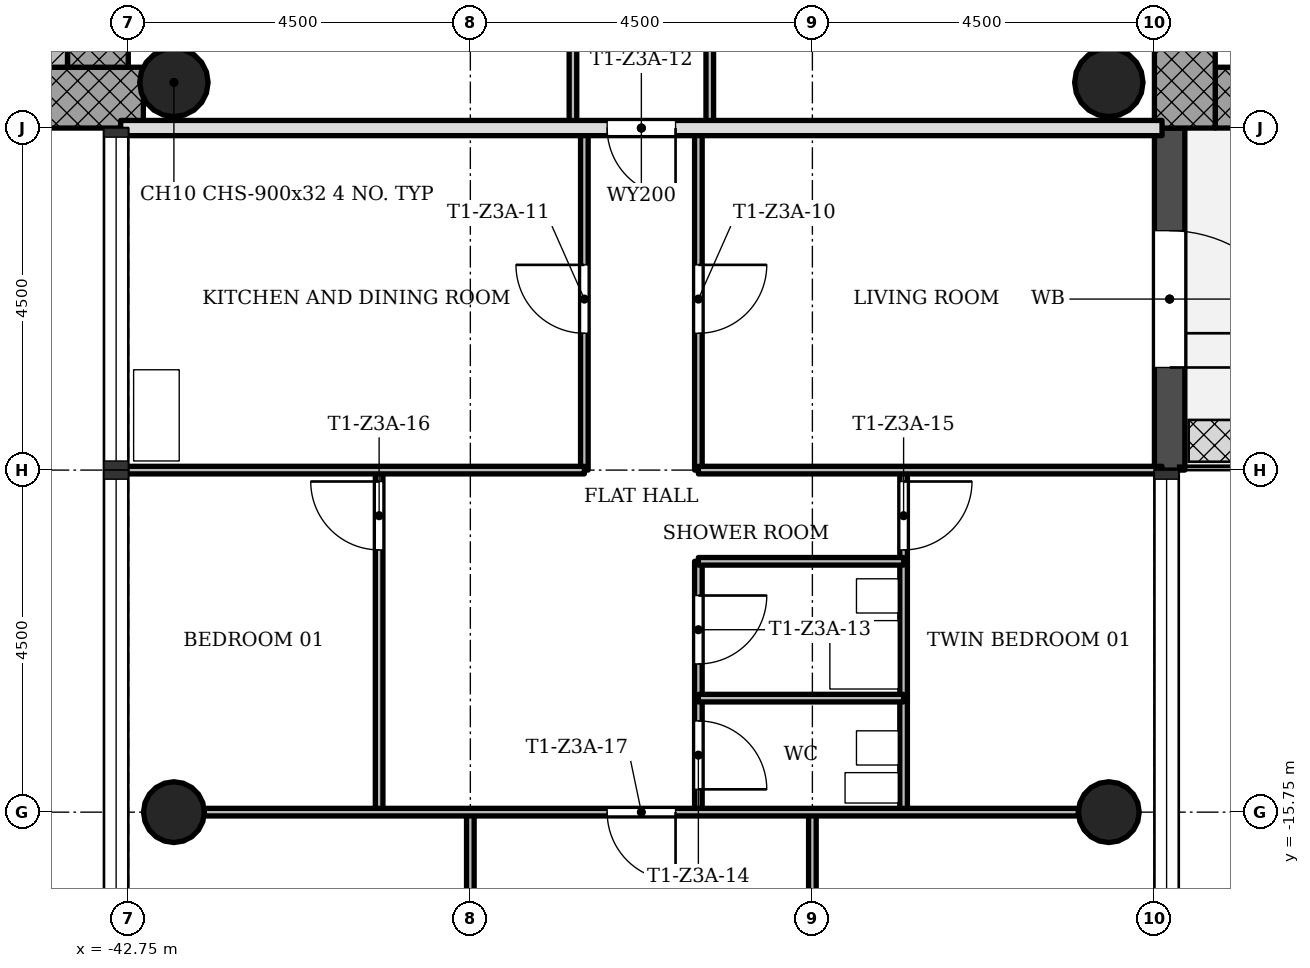
"""IFC4 building model, lengths in metres.
Left out: names, types, materials, properties, quantities, classifications, styles, units other than length and angle.
Written with IfcOpenShell. Run it as: python <this file> out.ifc"""

import sys

from ifc_helpers import new_model, si_unit, direction, frame, frame_2d, origin, origin_2d, place, context, subcontext, project, spatial, rectangle, hollow_circle, extrude, element, fill, save


model = new_model("IFC4")
c1 = context("Model", 3, precision=1e-05, world=origin(), true_north=direction((0.0, 1.0)))
c2 = subcontext(c1, "Body", "Model", "MODEL_VIEW")
j1 = project(units=[si_unit("LENGTHUNIT", "METRE"), si_unit("PLANEANGLEUNIT", "RADIAN")], contexts=[c1])
p1 = place(None, origin())
s1 = spatial("IfcSite", under=j1, at=p1, CompositionType="ELEMENT")
p2 = place(p1, origin())
s2 = spatial("IfcBuilding", under=s1, at=p2, CompositionType="ELEMENT")
p3 = place(p2, frame((0.0, 0.0, 140.5)))
s3 = spatial("IfcBuildingStorey", under=s2, at=p3, CompositionType="ELEMENT", Elevation=140.5)
p4 = place(p3, frame((-28.45, -6.35, 0.0), z_axis=(0.0, 0.0, 1.0), x_axis=(1.0, 0.0, 0.0)))
e1 = element("IfcWall", 1, at=p4, inside=s3, PredefinedType="SHEAR", context=c2, shape_type="SweptSolid", body=[
    extrude(rectangle(XDim=8.2, YDim=0.8, at=frame_2d((4.1, 0.0))), origin(), (0.0, 0.0, 1.0), 3.4),
])
p5 = place(p3, frame((-28.85, 5.95, 0.0), z_axis=(0.0, 0.0, 1.0), x_axis=(0.0, -1.0, 0.0)))
e2 = element("IfcWall", 2, at=p5, inside=s3, PredefinedType="SHEAR", context=c2, shape_type="SweptSolid", body=[
    extrude(rectangle(XDim=12.7, YDim=0.8, at=frame_2d((6.35, 0.0))), origin(), (0.0, 0.0, 1.0), 3.4),
])
p6 = place(p5, frame((5.05, 0.0, 0.0)))
e3 = element("IfcOpeningElement", 3, at=p6, cuts=e2, PredefinedType="OPENING", context=c2, shape_type="SweptSolid", body=[
    extrude(rectangle(XDim=1.8, YDim=2.1, at=frame_2d((0.9, 1.05))), frame((0.0, 0.41, 0.0), z_axis=(0.0, -1.0, 0.0), x_axis=(1.0, 0.0, 0.0)), (0.0, 0.0, 1.0), 0.82),
])
p7 = place(p3, frame((-50.95, -6.35, 0.0), z_axis=(0.0, 0.0, 1.0), x_axis=(1.0, 0.0, 0.0)))
e4 = element("IfcWall", 4, at=p7, inside=s3, PredefinedType="SHEAR", context=c2, shape_type="SweptSolid", body=[
    extrude(rectangle(XDim=8.398, YDim=0.8, at=frame_2d((4.199, 0.0))), origin(), (0.0, 0.0, 1.0), 3.4),
])
p8 = place(p3, frame((-43.15, -5.95, 0.0), z_axis=(0.0, 0.0, 1.0), x_axis=(0.0, 1.0, 0.0)))
e5 = element("IfcWall", 5, at=p8, inside=s3, PredefinedType="SHEAR", context=c2, shape_type="SweptSolid", body=[
    extrude(rectangle(XDim=12.7, YDim=0.8, at=frame_2d((6.35, 0.0))), origin(), (0.0, 0.0, 1.0), 3.4),
])
p9 = place(p8, frame((5.05, 0.0, 0.0)))
e6 = element("IfcOpeningElement", 6, at=p9, cuts=e5, PredefinedType="OPENING", context=c2, shape_type="SweptSolid", body=[
    extrude(rectangle(XDim=1.8, YDim=2.1, at=frame_2d((0.9, 1.05))), frame((0.0, 0.41, 0.0), z_axis=(0.0, -1.0, 0.0), x_axis=(1.0, 0.0, 0.0)), (0.0, 0.0, 1.0), 0.82),
])
for number, where, z_axis, x_axis in (
    (7, (-42.15, -15.75, 0.0), (0.0, 0.0, 1.0), (1.0, 0.0, 0.0)),
    (8, (-29.85, -15.75, 0.0), (0.0, 0.0, 1.0), (1.0, 0.0, 0.0)),
):
    element("IfcColumn", number, at=place(p3, frame(where, z_axis=z_axis, x_axis=x_axis)), inside=s3, PredefinedType="COLUMN", context=c2, shape_type="SweptSolid", body=[
        extrude(hollow_circle(Radius=0.4, WallThickness=0.028, at=origin_2d()), origin(), (0.0, 0.0, 1.0), 3.4),
    ])
for number, where, z_axis, x_axis in (
    (9, (-42.15, -6.15, 0.0), (0.0, 0.0, 1.0), (1.0, 0.0, 0.0)),
    (10, (-29.85, -6.15, 0.0), (0.0, 0.0, 1.0), (1.0, 0.0, 0.0)),
):
    element("IfcColumn", number, at=place(p3, frame(where, z_axis=z_axis, x_axis=x_axis)), inside=s3, PredefinedType="COLUMN", context=c2, shape_type="SweptSolid", body=[
        extrude(hollow_circle(Radius=0.45, WallThickness=0.032, at=origin_2d()), origin(), (0.0, 0.0, 1.0), 3.4),
    ])
p10 = place(p3, frame((-29.05, -11.25, -0.02), z_axis=(0.0, 0.0, 1.0), x_axis=(0.0, 1.0, 0.0)))
e11 = element("IfcWall", 11, at=p10, inside=s3, PredefinedType="STANDARD", context=c2, shape_type="SweptSolid", body=[
    extrude(rectangle(XDim=4.5, YDim=0.4, at=frame_2d((2.25, 0.0))), origin(), (0.0, 0.0, 1.0), 3.12),
])
p11 = place(p10, frame((1.35, 0.0, 0.02)))
e12 = element("IfcOpeningElement", 12, at=p11, cuts=e11, PredefinedType="OPENING", context=c2, shape_type="SweptSolid", body=[
    extrude(rectangle(XDim=1.8, YDim=2.1, at=frame_2d((0.9, 1.05))), frame((0.0, 0.21, 0.0), z_axis=(0.0, -1.0, 0.0), x_axis=(1.0, 0.0, 0.0)), (0.0, 0.0, 1.0), 0.42),
])
p12 = place(p3, frame((-39.45, -15.75, 0.0), z_axis=(0.0, 0.0, 1.0), x_axis=(0.0, 1.0, 0.0)))
e13 = element("IfcWall", 13, at=p12, inside=s3, PredefinedType="PARTITIONING", context=c2, shape_type="SweptSolid", body=[
    extrude(rectangle(XDim=4.5, YDim=0.1, at=frame_2d((2.25, 0.0))), origin(), (0.0, 0.0, 1.0), 3.0),
])
p13 = place(p12, frame((3.45, 0.0, 0.0)))
e14 = element("IfcOpeningElement", 14, at=p13, cuts=e13, PredefinedType="OPENING", context=c2, shape_type="SweptSolid", body=[
    extrude(rectangle(XDim=0.9, YDim=2.1, at=frame_2d((0.45, 1.05))), frame((0.0, 0.06, 0.0), z_axis=(0.0, -1.0, 0.0), x_axis=(1.0, 0.0, 0.0)), (0.0, 0.0, 1.0), 0.12),
])
p14 = place(p3, frame((-38.25, -20.35, 0.0), z_axis=(0.0, 0.0, 1.0), x_axis=(0.0, 1.0, 0.0)))
e15 = element("IfcWall", 15, at=p14, inside=s3, PredefinedType="PARTITIONING", context=c2, shape_type="SweptSolid", body=[
    extrude(rectangle(XDim=4.6, YDim=0.1, at=frame_2d((2.3, 0.0))), origin(), (0.0, 0.0, 1.0), 3.0),
])
p15 = place(p14, frame((2.65, 0.0, 0.0)))
e16 = element("IfcOpeningElement", 16, at=p15, cuts=e15, PredefinedType="OPENING", context=c2, shape_type="SweptSolid", body=[
    extrude(rectangle(XDim=0.9, YDim=2.1, at=frame_2d((0.45, 1.05))), frame((0.0, 0.06, 0.0), z_axis=(0.0, -1.0, 0.0), x_axis=(1.0, 0.0, 0.0)), (0.0, 0.0, 1.0), 0.12),
])
p16 = place(p3, frame((-36.9, -6.75, 0.0), z_axis=(0.0, 0.0, 1.0), x_axis=(0.0, 1.0, 0.0)))
e17 = element("IfcWall", 17, at=p16, inside=s3, PredefinedType="PARTITIONING", context=c2, shape_type="SweptSolid", body=[
    extrude(rectangle(XDim=2.25, YDim=0.1, at=frame_2d((1.125, 0.0))), origin(), (0.0, 0.0, 1.0), 3.0),
])
p17 = place(p3, frame((-36.75, -11.25, 0.0), z_axis=(0.0, 0.0, 1.0), x_axis=(0.0, 1.0, 0.0)))
e18 = element("IfcWall", 18, at=p17, inside=s3, PredefinedType="PARTITIONING", context=c2, shape_type="SweptSolid", body=[
    extrude(rectangle(XDim=4.5, YDim=0.1, at=frame_2d((2.25, 0.0))), origin(), (0.0, 0.0, 1.0), 3.0),
])
p18 = place(p17, frame((1.8, 0.0, 0.0)))
e19 = element("IfcOpeningElement", 19, at=p18, cuts=e18, PredefinedType="OPENING", context=c2, shape_type="SweptSolid", body=[
    extrude(rectangle(XDim=0.9, YDim=2.1, at=frame_2d((0.45, 1.05))), frame((0.0, 0.06, 0.0), z_axis=(0.0, -1.0, 0.0), x_axis=(1.0, 0.0, 0.0)), (0.0, 0.0, 1.0), 0.12),
])
p19 = place(p3, frame((-35.25, -15.75, 0.0), z_axis=(0.0, 0.0, 1.0), x_axis=(0.0, 1.0, 0.0)))
e20 = element("IfcWall", 20, at=p19, inside=s3, PredefinedType="PARTITIONING", context=c2, shape_type="SweptSolid", body=[
    extrude(rectangle(XDim=3.3, YDim=0.1, at=frame_2d((1.65, 0.0))), origin(), (0.0, 0.0, 1.0), 3.0),
])
p20 = place(p19, frame((1.95, 0.0, 0.0)))
e21 = element("IfcOpeningElement", 21, at=p20, cuts=e20, PredefinedType="OPENING", context=c2, shape_type="SweptSolid", body=[
    extrude(rectangle(XDim=0.9, YDim=2.1, at=frame_2d((0.45, 1.05))), frame((0.0, 0.06, 0.0), z_axis=(0.0, -1.0, 0.0), x_axis=(1.0, 0.0, 0.0)), (0.0, 0.0, 1.0), 0.12),
])
p21 = place(p19, frame((0.3, 0.0, 0.0)))
e22 = element("IfcOpeningElement", 22, at=p21, cuts=e20, PredefinedType="OPENING", context=c2, shape_type="SweptSolid", body=[
    extrude(rectangle(XDim=0.9, YDim=2.1, at=frame_2d((0.45, 1.05))), frame((0.0, 0.06, 0.0), z_axis=(0.0, -1.0, 0.0), x_axis=(1.0, 0.0, 0.0)), (0.0, 0.0, 1.0), 0.12),
])
p22 = place(p3, frame((-35.25, -11.25, 0.0), z_axis=(0.0, 0.0, 1.0), x_axis=(0.0, 1.0, 0.0)))
e23 = element("IfcWall", 23, at=p22, inside=s3, PredefinedType="PARTITIONING", context=c2, shape_type="SweptSolid", body=[
    extrude(rectangle(XDim=4.5, YDim=0.1, at=frame_2d((2.25, 0.0))), origin(), (0.0, 0.0, 1.0), 3.0),
])
p23 = place(p22, frame((1.8, 0.0, 0.0)))
e24 = element("IfcOpeningElement", 24, at=p23, cuts=e23, PredefinedType="OPENING", context=c2, shape_type="SweptSolid", body=[
    extrude(rectangle(XDim=0.9, YDim=2.1, at=frame_2d((0.45, 1.05))), frame((0.0, 0.06, 0.0), z_axis=(0.0, -1.0, 0.0), x_axis=(1.0, 0.0, 0.0)), (0.0, 0.0, 1.0), 0.12),
])
p24 = place(p3, frame((-35.1, -6.75, 0.0), z_axis=(0.0, 0.0, 1.0), x_axis=(0.0, 1.0, 0.0)))
e25 = element("IfcWall", 25, at=p24, inside=s3, PredefinedType="PARTITIONING", context=c2, shape_type="SweptSolid", body=[
    extrude(rectangle(XDim=2.25, YDim=0.1, at=frame_2d((1.125, 0.0))), origin(), (0.0, 0.0, 1.0), 3.0),
])
p25 = place(p3, frame((-33.75, -20.35, 0.0), z_axis=(0.0, 0.0, 1.0), x_axis=(0.0, 1.0, 0.0)))
e26 = element("IfcWall", 26, at=p25, inside=s3, PredefinedType="PARTITIONING", context=c2, shape_type="SweptSolid", body=[
    extrude(rectangle(XDim=4.6, YDim=0.1, at=frame_2d((2.3, 0.0))), origin(), (0.0, 0.0, 1.0), 3.0),
])
p26 = place(p25, frame((2.65, 0.0, 0.0)))
e27 = element("IfcOpeningElement", 27, at=p26, cuts=e26, PredefinedType="OPENING", context=c2, shape_type="SweptSolid", body=[
    extrude(rectangle(XDim=0.9, YDim=2.1, at=frame_2d((0.45, 1.05))), frame((0.0, 0.06, 0.0), z_axis=(0.0, -1.0, 0.0), x_axis=(1.0, 0.0, 0.0)), (0.0, 0.0, 1.0), 0.12),
])
p27 = place(p3, frame((-32.55, -15.75, 0.0), z_axis=(0.0, 0.0, 1.0), x_axis=(0.0, 1.0, 0.0)))
e28 = element("IfcWall", 28, at=p27, inside=s3, PredefinedType="PARTITIONING", context=c2, shape_type="SweptSolid", body=[
    extrude(rectangle(XDim=4.5, YDim=0.1, at=frame_2d((2.25, 0.0))), origin(), (0.0, 0.0, 1.0), 3.0),
])
p28 = place(p27, frame((3.45, 0.0, 0.0)))
e29 = element("IfcOpeningElement", 29, at=p28, cuts=e28, PredefinedType="OPENING", context=c2, shape_type="SweptSolid", body=[
    extrude(rectangle(XDim=0.9, YDim=2.1, at=frame_2d((0.45, 1.05))), frame((0.0, 0.06, 0.0), z_axis=(0.0, -1.0, 0.0), x_axis=(1.0, 0.0, 0.0)), (0.0, 0.0, 1.0), 0.12),
])
p29 = place(p3, frame((-41.75, -15.75, 0.0), z_axis=(0.0, 0.0, 1.0), x_axis=(1.0, 0.0, 0.0)))
e30 = element("IfcWall", 30, at=p29, inside=s3, PredefinedType="PARTITIONING", context=c2, shape_type="SweptSolid", body=[
    extrude(rectangle(XDim=11.5, YDim=0.1, at=frame_2d((5.75, 0.0))), origin(), (0.0, 0.0, 1.0), 3.0),
])
p30 = place(p29, frame((5.3, 0.0, 0.0)))
e31 = element("IfcOpeningElement", 31, at=p30, cuts=e30, PredefinedType="OPENING", context=c2, shape_type="SweptSolid", body=[
    extrude(rectangle(XDim=0.9, YDim=2.1, at=frame_2d((0.45, 1.05))), frame((0.0, 0.06, 0.0), z_axis=(0.0, -1.0, 0.0), x_axis=(1.0, 0.0, 0.0)), (0.0, 0.0, 1.0), 0.12),
])
for number, where, z_axis, x_axis in (
    (32, (-35.25, -14.25, 0.0), (0.0, 0.0, 1.0), (1.0, 0.0, 0.0)),
    (33, (-35.25, -12.45, 0.0), (0.0, 0.0, 1.0), (1.0, 0.0, 0.0)),
):
    element("IfcWall", number, at=place(p3, frame(where, z_axis=z_axis, x_axis=x_axis)), inside=s3, PredefinedType="PARTITIONING", context=c2, shape_type="SweptSolid", body=[
        extrude(rectangle(XDim=2.7, YDim=0.1, at=frame_2d((1.35, 0.0))), origin(), (0.0, 0.0, 1.0), 3.0),
    ])
for number, where, z_axis, x_axis in (
    (34, (-42.85, -11.25, 0.0), (0.0, 0.0, 1.0), (1.0, 0.0, 0.0)),
    (35, (-35.25, -11.25, 0.0), (0.0, 0.0, 1.0), (1.0, 0.0, 0.0)),
):
    element("IfcWall", number, at=place(p3, frame(where, z_axis=z_axis, x_axis=x_axis)), inside=s3, PredefinedType="PARTITIONING", context=c2, shape_type="SweptSolid", body=[
        extrude(rectangle(XDim=6.1, YDim=0.1, at=frame_2d((3.05, 0.0))), origin(), (0.0, 0.0, 1.0), 3.0),
    ])
p31 = place(p3, frame((-42.85, -6.75, 0.0), z_axis=(0.0, 0.0, 1.0), x_axis=(1.0, 0.0, 0.0)))
e36 = element("IfcWall", 36, at=p31, inside=s3, PredefinedType="SOLIDWALL", context=c2, shape_type="SweptSolid", body=[
    extrude(rectangle(XDim=13.7, YDim=0.2, at=frame_2d((6.85, 0.0))), origin(), (0.0, 0.0, 1.0), 3.0),
])
p32 = place(p31, frame((6.4, 0.0, 0.0)))
e37 = element("IfcOpeningElement", 37, at=p32, cuts=e36, PredefinedType="OPENING", context=c2, shape_type="SweptSolid", body=[
    extrude(rectangle(XDim=0.9, YDim=2.1, at=frame_2d((0.45, 1.05))), frame((0.0, 0.11, 0.0), z_axis=(0.0, -1.0, 0.0), x_axis=(1.0, 0.0, 0.0)), (0.0, 0.0, 1.0), 0.22),
])
p33 = place(p3, frame((-43.75, -1.85, 0.0), z_axis=(0.0, 0.0, 1.0), x_axis=(0.0, -1.0, 0.0)))
e38 = element("IfcWall", 38, at=p33, inside=s3, PredefinedType="SHEAR", context=c2, shape_type="SweptSolid", body=[
    extrude(rectangle(XDim=4.1, YDim=0.4, at=frame_2d((2.05, 0.0))), origin(), (0.0, 0.0, 1.0), 3.4),
])
p34 = place(p11, origin())
e39 = element("IfcDoor", 39, at=p34, inside=s3, OperationType="SINGLE_SWING_LEFT", PredefinedType="DOOR", context=c2, shape_type="SweptSolid", body=[
    extrude(rectangle(XDim=1.8, YDim=2.1, at=frame_2d((0.9, 1.05))), frame((0.0, 0.025, 0.0), z_axis=(0.0, -1.0, 0.0), x_axis=(1.0, 0.0, 0.0)), (0.0, 0.0, 1.0), 0.05),
])
fill(e12, e39)
p35 = place(p23, origin())
e40 = element("IfcDoor", 40, at=p35, inside=s3, OperationType="SINGLE_SWING_RIGHT", PredefinedType="DOOR", context=c2, shape_type="SweptSolid", body=[
    extrude(rectangle(XDim=0.9, YDim=2.1, at=frame_2d((0.45, 1.05))), frame((0.0, 0.025, 0.0), z_axis=(0.0, -1.0, 0.0), x_axis=(1.0, 0.0, 0.0)), (0.0, 0.0, 1.0), 0.05),
])
fill(e24, e40)
p36 = place(p18, origin())
e41 = element("IfcDoor", 41, at=p36, inside=s3, OperationType="SINGLE_SWING_LEFT", PredefinedType="DOOR", context=c2, shape_type="SweptSolid", body=[
    extrude(rectangle(XDim=0.9, YDim=2.1, at=frame_2d((0.45, 1.05))), frame((0.0, 0.025, 0.0), z_axis=(0.0, -1.0, 0.0), x_axis=(1.0, 0.0, 0.0)), (0.0, 0.0, 1.0), 0.05),
])
fill(e19, e41)
p37 = place(p32, origin())
e42 = element("IfcDoor", 42, at=p37, inside=s3, OperationType="SINGLE_SWING_RIGHT", PredefinedType="DOOR", context=c2, shape_type="SweptSolid", body=[
    extrude(rectangle(XDim=0.9, YDim=2.1, at=frame_2d((0.45, 1.05))), frame((0.0, 0.025, 0.0), z_axis=(0.0, -1.0, 0.0), x_axis=(1.0, 0.0, 0.0)), (0.0, 0.0, 1.0), 0.05),
])
fill(e37, e42)
p38 = place(p20, origin())
e43 = element("IfcDoor", 43, at=p38, inside=s3, OperationType="SINGLE_SWING_RIGHT", PredefinedType="DOOR", context=c2, shape_type="SweptSolid", body=[
    extrude(rectangle(XDim=0.9, YDim=2.1, at=frame_2d((0.45, 1.05))), frame((0.0, 0.025, 0.0), z_axis=(0.0, -1.0, 0.0), x_axis=(1.0, 0.0, 0.0)), (0.0, 0.0, 1.0), 0.05),
])
fill(e21, e43)
p39 = place(p21, origin())
e44 = element("IfcDoor", 44, at=p39, inside=s3, OperationType="SINGLE_SWING_LEFT", PredefinedType="DOOR", context=c2, shape_type="SweptSolid", body=[
    extrude(rectangle(XDim=0.9, YDim=2.1, at=frame_2d((0.45, 1.05))), frame((0.0, 0.025, 0.0), z_axis=(0.0, -1.0, 0.0), x_axis=(1.0, 0.0, 0.0)), (0.0, 0.0, 1.0), 0.05),
])
fill(e22, e44)
p40 = place(p28, origin())
e45 = element("IfcDoor", 45, at=p40, inside=s3, OperationType="SINGLE_SWING_RIGHT", PredefinedType="DOOR", context=c2, shape_type="SweptSolid", body=[
    extrude(rectangle(XDim=0.9, YDim=2.1, at=frame_2d((0.45, 1.05))), frame((0.0, 0.025, 0.0), z_axis=(0.0, -1.0, 0.0), x_axis=(1.0, 0.0, 0.0)), (0.0, 0.0, 1.0), 0.05),
])
fill(e29, e45)
p41 = place(p13, origin())
e46 = element("IfcDoor", 46, at=p41, inside=s3, OperationType="SINGLE_SWING_LEFT", PredefinedType="DOOR", context=c2, shape_type="SweptSolid", body=[
    extrude(rectangle(XDim=0.9, YDim=2.1, at=frame_2d((0.45, 1.05))), frame((0.0, 0.025, 0.0), z_axis=(0.0, -1.0, 0.0), x_axis=(1.0, 0.0, 0.0)), (0.0, 0.0, 1.0), 0.05),
])
fill(e14, e46)
p42 = place(p30, origin())
e47 = element("IfcDoor", 47, at=p42, inside=s3, OperationType="SINGLE_SWING_RIGHT", PredefinedType="DOOR", context=c2, shape_type="SweptSolid", body=[
    extrude(rectangle(XDim=0.9, YDim=2.1, at=frame_2d((0.45, 1.05))), frame((0.0, 0.025, 0.0), z_axis=(0.0, -1.0, 0.0), x_axis=(1.0, 0.0, 0.0)), (0.0, 0.0, 1.0), 0.05),
])
fill(e31, e47)
save(model, sys.argv[1])
